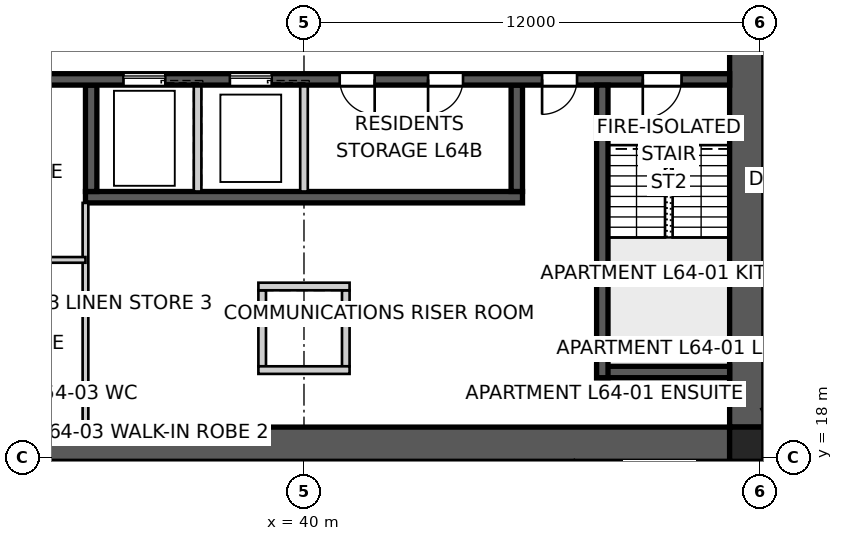
"""IFC4 building model, lengths in metres.
Left out: names, types, materials, properties, quantities, classifications, styles, units other than length and angle.
Written with IfcOpenShell. Run it as: python <this file> out.ifc"""

import sys

from ifc_helpers import new_model, si_unit, direction, frame, frame_2d, origin, origin_2d, place, context, subcontext, project, spatial, polyline, rectangle, outline, extrude, element, fill, save


model = new_model("IFC4")
c1 = context("Model", 3, precision=1e-05, world=origin(), true_north=direction((0.0, 1.0)))
c2 = subcontext(c1, "Body", "Model", "MODEL_VIEW")
j1 = project(units=[si_unit("LENGTHUNIT", "METRE"), si_unit("PLANEANGLEUNIT", "RADIAN")], contexts=[c1])
p1 = place(None, origin())
s1 = spatial("IfcSite", under=j1, at=p1, CompositionType="ELEMENT")
p2 = place(p1, origin())
s2 = spatial("IfcBuilding", under=s1, at=p2, CompositionType="ELEMENT")
p3 = place(p2, frame((0.0, 0.0, 232.0)))
s3 = spatial("IfcBuildingStorey", under=s2, at=p3, CompositionType="ELEMENT", Elevation=232.0)
p4 = place(p3, frame((51.2, 18.35, 0.0), z_axis=(0.0, 0.0, 1.0), x_axis=(-1.0, 0.0, 0.0)))
e1 = element("IfcWall", 1, at=p4, inside=s3, PredefinedType="SHEAR", context=c2, shape_type="SweptSolid", body=[
    extrude(outline(polyline([(0.0, -0.45), (22.4, -0.45), (22.4, -0.025), (22.85, -0.025), (22.85, 0.025), (22.4, 0.025), (22.4, 0.45), (0.0, 0.45), (0.0, 0.025), (-0.45, 0.025), (-0.45, -0.025), (0.0, -0.025), (0.0, -0.45)])), origin(), (0.0, 0.0, 1.0), 3.4),
])
p5 = place(p3, frame((51.65, 18.8, 0.0), z_axis=(0.0, 0.0, 1.0), x_axis=(0.0, 1.0, 0.0)))
e2 = element("IfcWall", 2, at=p5, inside=s3, PredefinedType="SHEAR", context=c2, shape_type="SweptSolid", body=[
    extrude(outline(polyline([(0.0, -0.45), (22.4, -0.45), (22.4, -0.025), (22.85, -0.025), (22.85, 0.025), (22.4, 0.025), (22.4, 0.45), (0.0, 0.45), (0.0, 0.025), (-0.45, 0.025), (-0.45, -0.025), (0.0, -0.025), (0.0, -0.45)])), origin(), (0.0, 0.0, 1.0), 3.4),
])
p6 = place(p5, frame((11.14, 0.0, 0.0)))
e3 = element("IfcOpeningElement", 3, at=p6, cuts=e2, PredefinedType="OPENING", context=c2, shape_type="SweptSolid", body=[
    extrude(rectangle(XDim=1.02, YDim=2.4, at=frame_2d((0.51, 1.2))), frame((0.0, 0.46, 0.0), z_axis=(0.0, -1.0, 0.0), x_axis=(1.0, 0.0, 0.0)), (0.0, 0.0, 1.0), 0.92),
])
p7 = place(p3, frame((51.2, 27.95, 0.0), z_axis=(0.0, 0.0, 1.0), x_axis=(-1.0, 0.0, 0.0)))
e4 = element("IfcWall", 4, at=p7, inside=s3, PredefinedType="SHEAR", context=c2, shape_type="SweptSolid", body=[
    extrude(rectangle(XDim=22.4, YDim=0.3, at=frame_2d((11.2, 0.0))), origin(), (0.0, 0.0, 1.0), 3.4),
])
p8 = place(p7, frame((19.04, 0.0, 0.0)))
e5 = element("IfcOpeningElement", 5, at=p8, cuts=e4, PredefinedType="OPENING", context=c2, shape_type="SweptSolid", body=[
    extrude(rectangle(XDim=0.92, YDim=2.1, at=frame_2d((0.46, 1.05))), frame((0.0, 0.16, 0.0), z_axis=(0.0, -1.0, 0.0), x_axis=(1.0, 0.0, 0.0)), (0.0, 0.0, 1.0), 0.32),
])
p9 = place(p7, frame((1.265, 0.0, 0.0)))
e6 = element("IfcOpeningElement", 6, at=p9, cuts=e4, PredefinedType="OPENING", context=c2, shape_type="SweptSolid", body=[
    extrude(rectangle(XDim=1.02, YDim=2.1, at=frame_2d((0.51, 1.05))), frame((0.0, 0.16, 0.0), z_axis=(0.0, -1.0, 0.0), x_axis=(1.0, 0.0, 0.0)), (0.0, 0.0, 1.0), 0.32),
])
p10 = place(p7, frame((4.015, 0.0, 0.0)))
e7 = element("IfcOpeningElement", 7, at=p10, cuts=e4, PredefinedType="OPENING", context=c2, shape_type="SweptSolid", body=[
    extrude(rectangle(XDim=0.92, YDim=2.1, at=frame_2d((0.46, 1.05))), frame((0.0, 0.16, 0.0), z_axis=(0.0, -1.0, 0.0), x_axis=(1.0, 0.0, 0.0)), (0.0, 0.0, 1.0), 0.32),
])
p11 = place(p7, frame((9.34, 0.0, 0.0)))
e8 = element("IfcOpeningElement", 8, at=p11, cuts=e4, PredefinedType="OPENING", context=c2, shape_type="SweptSolid", body=[
    extrude(rectangle(XDim=0.92, YDim=2.1, at=frame_2d((0.46, 1.05))), frame((0.0, 0.16, 0.0), z_axis=(0.0, -1.0, 0.0), x_axis=(1.0, 0.0, 0.0)), (0.0, 0.0, 1.0), 0.32),
])
p12 = place(p7, frame((7.015, 0.0, 0.0)))
e9 = element("IfcOpeningElement", 9, at=p12, cuts=e4, PredefinedType="OPENING", context=c2, shape_type="SweptSolid", body=[
    extrude(rectangle(XDim=0.92, YDim=2.1, at=frame_2d((0.46, 1.05))), frame((0.0, 0.16, 0.0), z_axis=(0.0, -1.0, 0.0), x_axis=(1.0, 0.0, 0.0)), (0.0, 0.0, 1.0), 0.32),
])
p13 = place(p7, frame((12.05, 0.0, 0.0)))
e10 = element("IfcOpeningElement", 10, at=p13, cuts=e4, PredefinedType="OPENING", context=c2, shape_type="SweptSolid", body=[
    extrude(rectangle(XDim=1.1, YDim=2.1, at=frame_2d((0.55, 1.05))), frame((0.0, 0.16, 0.0), z_axis=(0.0, -1.0, 0.0), x_axis=(1.0, 0.0, 0.0)), (0.0, 0.0, 1.0), 0.32),
])
p14 = place(p7, frame((14.85, 0.0, 0.0)))
e11 = element("IfcOpeningElement", 11, at=p14, cuts=e4, PredefinedType="OPENING", context=c2, shape_type="SweptSolid", body=[
    extrude(rectangle(XDim=1.1, YDim=2.1, at=frame_2d((0.55, 1.05))), frame((0.0, 0.16, 0.0), z_axis=(0.0, -1.0, 0.0), x_axis=(1.0, 0.0, 0.0)), (0.0, 0.0, 1.0), 0.32),
])
p15 = place(p3, frame((45.75, 24.85, 0.0), z_axis=(0.0, 0.0, 1.0), x_axis=(-1.0, 0.0, 0.0)))
e12 = element("IfcWall", 12, at=p15, inside=s3, PredefinedType="SHEAR", context=c2, shape_type="SweptSolid", body=[
    extrude(rectangle(XDim=11.5, YDim=0.3, at=frame_2d((5.75, 0.0))), origin(), (0.0, 0.0, 1.0), 3.4),
])
p16 = place(p3, frame((45.6, 27.8, 0.0), z_axis=(0.0, 0.0, 1.0), x_axis=(0.0, -1.0, 0.0)))
e13 = element("IfcWall", 13, at=p16, inside=s3, PredefinedType="SHEAR", context=c2, shape_type="SweptSolid", body=[
    extrude(rectangle(XDim=2.8, YDim=0.3, at=frame_2d((1.4, 0.0))), origin(), (0.0, 0.0, 1.0), 3.4),
])
for number, where, z_axis, x_axis in (
    (14, (40.0, 27.8, 0.0), (0.0, 0.0, 1.0), (0.0, -1.0, 0.0)),
    (15, (37.2, 27.8, 0.0), (0.0, 0.0, 1.0), (0.0, -1.0, 0.0)),
):
    element("IfcWall", number, at=place(p3, frame(where, z_axis=z_axis, x_axis=x_axis)), inside=s3, PredefinedType="SOLIDWALL", context=c2, shape_type="SweptSolid", body=[
        extrude(rectangle(XDim=2.8, YDim=0.2, at=frame_2d((1.4, 0.0))), origin(), (0.0, 0.0, 1.0), 3.4),
    ])
p17 = place(p3, frame((34.4, 27.8, 0.0), z_axis=(0.0, 0.0, 1.0), x_axis=(0.0, -1.0, 0.0)))
e16 = element("IfcWall", 16, at=p17, inside=s3, PredefinedType="SHEAR", context=c2, shape_type="SweptSolid", body=[
    extrude(rectangle(XDim=2.8, YDim=0.3, at=frame_2d((1.4, 0.0))), origin(), (0.0, 0.0, 1.0), 3.4),
])
p18 = place(p3, frame((47.85, 27.8, 0.0), z_axis=(0.0, 0.0, 1.0), x_axis=(0.0, -1.0, 0.0)))
e17 = element("IfcWall", 17, at=p18, inside=s3, PredefinedType="SHEAR", context=c2, shape_type="SweptSolid", body=[
    extrude(rectangle(XDim=7.7, YDim=0.3, at=frame_2d((3.85, 0.0))), origin(), (0.0, 0.0, 1.0), 3.4),
])
p19 = place(p3, frame((51.2, 20.25, 0.0), z_axis=(0.0, 0.0, 1.0), x_axis=(-1.0, 0.0, 0.0)))
e18 = element("IfcWall", 18, at=p19, inside=s3, PredefinedType="SHEAR", context=c2, shape_type="SweptSolid", body=[
    extrude(rectangle(XDim=3.5, YDim=0.3, at=frame_2d((1.75, 0.0))), origin(), (0.0, 0.0, 1.0), 3.4),
])
for number, where, z_axis, x_axis in (
    (19, (38.9, 22.4, 0.0), (0.0, 0.0, 1.0), (0.0, -1.0, 0.0)),
    (20, (41.1, 22.4, 0.0), (0.0, 0.0, 1.0), (0.0, -1.0, 0.0)),
):
    element("IfcWall", number, at=place(p3, frame(where, z_axis=z_axis, x_axis=x_axis)), inside=s3, PredefinedType="SOLIDWALL", context=c2, shape_type="SweptSolid", body=[
        extrude(rectangle(XDim=2.0, YDim=0.2, at=frame_2d((1.0, 0.0))), origin(), (0.0, 0.0, 1.0), 3.4),
    ])
for number, where, z_axis, x_axis in (
    (21, (38.8, 22.5, 0.0), (0.0, 0.0, 1.0), (1.0, 0.0, 0.0)),
    (22, (38.8, 20.3, 0.0), (0.0, 0.0, 1.0), (1.0, 0.0, 0.0)),
):
    element("IfcWall", number, at=place(p3, frame(where, z_axis=z_axis, x_axis=x_axis)), inside=s3, PredefinedType="SOLIDWALL", context=c2, shape_type="SweptSolid", body=[
        extrude(rectangle(XDim=2.4, YDim=0.2, at=frame_2d((1.2, 0.0))), origin(), (0.0, 0.0, 1.0), 3.4),
    ])
p20 = place(p3, frame((51.65, 18.35, 0.0), z_axis=(0.0, 0.0, 1.0), x_axis=(1.0, 0.0, 0.0)))
e23 = element("IfcColumn", 23, at=p20, inside=s3, PredefinedType="COLUMN", context=c2, shape_type="SweptSolid", body=[
    extrude(rectangle(XDim=0.9, YDim=0.9, at=origin_2d()), origin(), (0.0, 0.0, 1.0), 3.4),
])
p21 = place(p3, frame((51.25, 10.514, 0.0), z_axis=(0.0, 0.0, 1.0), x_axis=(-0.500008511703, 0.866020489494, 0.0)))
e24 = element("IfcWall", 24, at=p21, inside=s3, PredefinedType="PARTITIONING", context=c2, shape_type="SweptSolid", body=[
    extrude(rectangle(XDim=8.496, YDim=0.25, at=frame_2d((4.248, 0.0))), origin(), (0.0, 0.0, 1.0), 3.2),
])
p22 = place(p3, frame((34.25, 18.8, 0.0), z_axis=(0.0, 0.0, 1.0), x_axis=(0.0, 1.0, 0.0)))
e25 = element("IfcWall", 25, at=p22, inside=s3, PredefinedType="SOLIDWALL", context=c2, shape_type="SweptSolid", body=[
    extrude(rectangle(XDim=5.9, YDim=0.15, at=frame_2d((2.95, 0.0))), origin(), (0.0, 0.0, 1.0), 3.2),
])
p23 = place(p3, frame((34.25, 23.2, 0.0), z_axis=(0.0, 0.0, 1.0), x_axis=(-1.0, 0.0, 0.0)))
e26 = element("IfcWall", 26, at=p23, inside=s3, PredefinedType="SOLIDWALL", context=c2, shape_type="SweptSolid", body=[
    extrude(rectangle(XDim=5.45, YDim=0.15, at=frame_2d((2.725, 0.0))), origin(), (0.0, 0.0, 1.0), 3.2),
])
p24 = place(p23, frame((2.265, 0.0, 0.0)))
e27 = element("IfcOpeningElement", 27, at=p24, cuts=e26, PredefinedType="OPENING", context=c2, shape_type="SweptSolid", body=[
    extrude(rectangle(XDim=0.92, YDim=2.1, at=frame_2d((0.46, 1.05))), frame((0.0, 0.085, 0.0), z_axis=(0.0, -1.0, 0.0), x_axis=(1.0, 0.0, 0.0)), (0.0, 0.0, 1.0), 0.17),
])
p25 = place(p3, frame((53.779, 16.406, 0.0), z_axis=(0.0, 0.0, 1.0), x_axis=(-0.499969954228, 0.866042750024, 0.0)))
e28 = element("IfcWall", 28, at=p25, inside=s3, PredefinedType="SOLIDWALL", context=c2, shape_type="SweptSolid", body=[
    extrude(rectangle(XDim=3.359, YDim=0.15, at=frame_2d((1.679, 0.0))), origin(), (0.0, 0.0, 1.0), 3.2),
])
p26 = place(p25, frame((0.301, 0.0, 0.0)))
e29 = element("IfcOpeningElement", 29, at=p26, cuts=e28, PredefinedType="OPENING", context=c2, shape_type="SweptSolid", body=[
    extrude(rectangle(XDim=0.92, YDim=2.0, at=frame_2d((0.46, 1.0))), frame((0.0, 0.085, 0.0), z_axis=(0.0, -1.0, 0.0), x_axis=(1.0, 0.0, 0.0)), (0.0, 0.0, 1.0), 0.17),
])
p27 = place(p9, origin())
e30 = element("IfcDoor", 30, at=p27, inside=s3, OperationType="SINGLE_SWING_RIGHT", PredefinedType="DOOR", context=c2, shape_type="SweptSolid", body=[
    extrude(rectangle(XDim=1.02, YDim=2.1, at=frame_2d((0.51, 1.05))), frame((0.0, 0.025, 0.0), z_axis=(0.0, -1.0, 0.0), x_axis=(1.0, 0.0, 0.0)), (0.0, 0.0, 1.0), 0.05),
])
fill(e6, e30)
p28 = place(p10, origin())
e31 = element("IfcDoor", 31, at=p28, inside=s3, OperationType="SINGLE_SWING_RIGHT", PredefinedType="DOOR", context=c2, shape_type="SweptSolid", body=[
    extrude(rectangle(XDim=0.92, YDim=2.1, at=frame_2d((0.46, 1.05))), frame((0.0, 0.025, 0.0), z_axis=(0.0, -1.0, 0.0), x_axis=(1.0, 0.0, 0.0)), (0.0, 0.0, 1.0), 0.05),
])
fill(e7, e31)
p29 = place(p11, origin())
e32 = element("IfcDoor", 32, at=p29, inside=s3, OperationType="SINGLE_SWING_LEFT", PredefinedType="DOOR", context=c2, shape_type="SweptSolid", body=[
    extrude(rectangle(XDim=0.92, YDim=2.1, at=frame_2d((0.46, 1.05))), frame((0.0, 0.025, 0.0), z_axis=(0.0, -1.0, 0.0), x_axis=(1.0, 0.0, 0.0)), (0.0, 0.0, 1.0), 0.05),
])
fill(e8, e32)
p30 = place(p12, origin())
e33 = element("IfcDoor", 33, at=p30, inside=s3, OperationType="SINGLE_SWING_RIGHT", PredefinedType="DOOR", context=c2, shape_type="SweptSolid", body=[
    extrude(rectangle(XDim=0.92, YDim=2.1, at=frame_2d((0.46, 1.05))), frame((0.0, 0.025, 0.0), z_axis=(0.0, -1.0, 0.0), x_axis=(1.0, 0.0, 0.0)), (0.0, 0.0, 1.0), 0.05),
])
fill(e9, e33)
p31 = place(p13, origin())
e34 = element("IfcDoor", 34, at=p31, inside=s3, OperationType="SLIDING_TO_LEFT", PredefinedType="DOOR", context=c2, shape_type="SweptSolid", body=[
    extrude(rectangle(XDim=1.1, YDim=2.1, at=frame_2d((0.55, 1.05))), frame((0.0, 0.025, 0.0), z_axis=(0.0, -1.0, 0.0), x_axis=(1.0, 0.0, 0.0)), (0.0, 0.0, 1.0), 0.05),
])
fill(e10, e34)
p32 = place(p14, origin())
e35 = element("IfcDoor", 35, at=p32, inside=s3, OperationType="SLIDING_TO_LEFT", PredefinedType="DOOR", context=c2, shape_type="SweptSolid", body=[
    extrude(rectangle(XDim=1.1, YDim=2.1, at=frame_2d((0.55, 1.05))), frame((0.0, 0.025, 0.0), z_axis=(0.0, -1.0, 0.0), x_axis=(1.0, 0.0, 0.0)), (0.0, 0.0, 1.0), 0.05),
])
fill(e11, e35)
save(model, sys.argv[1])
